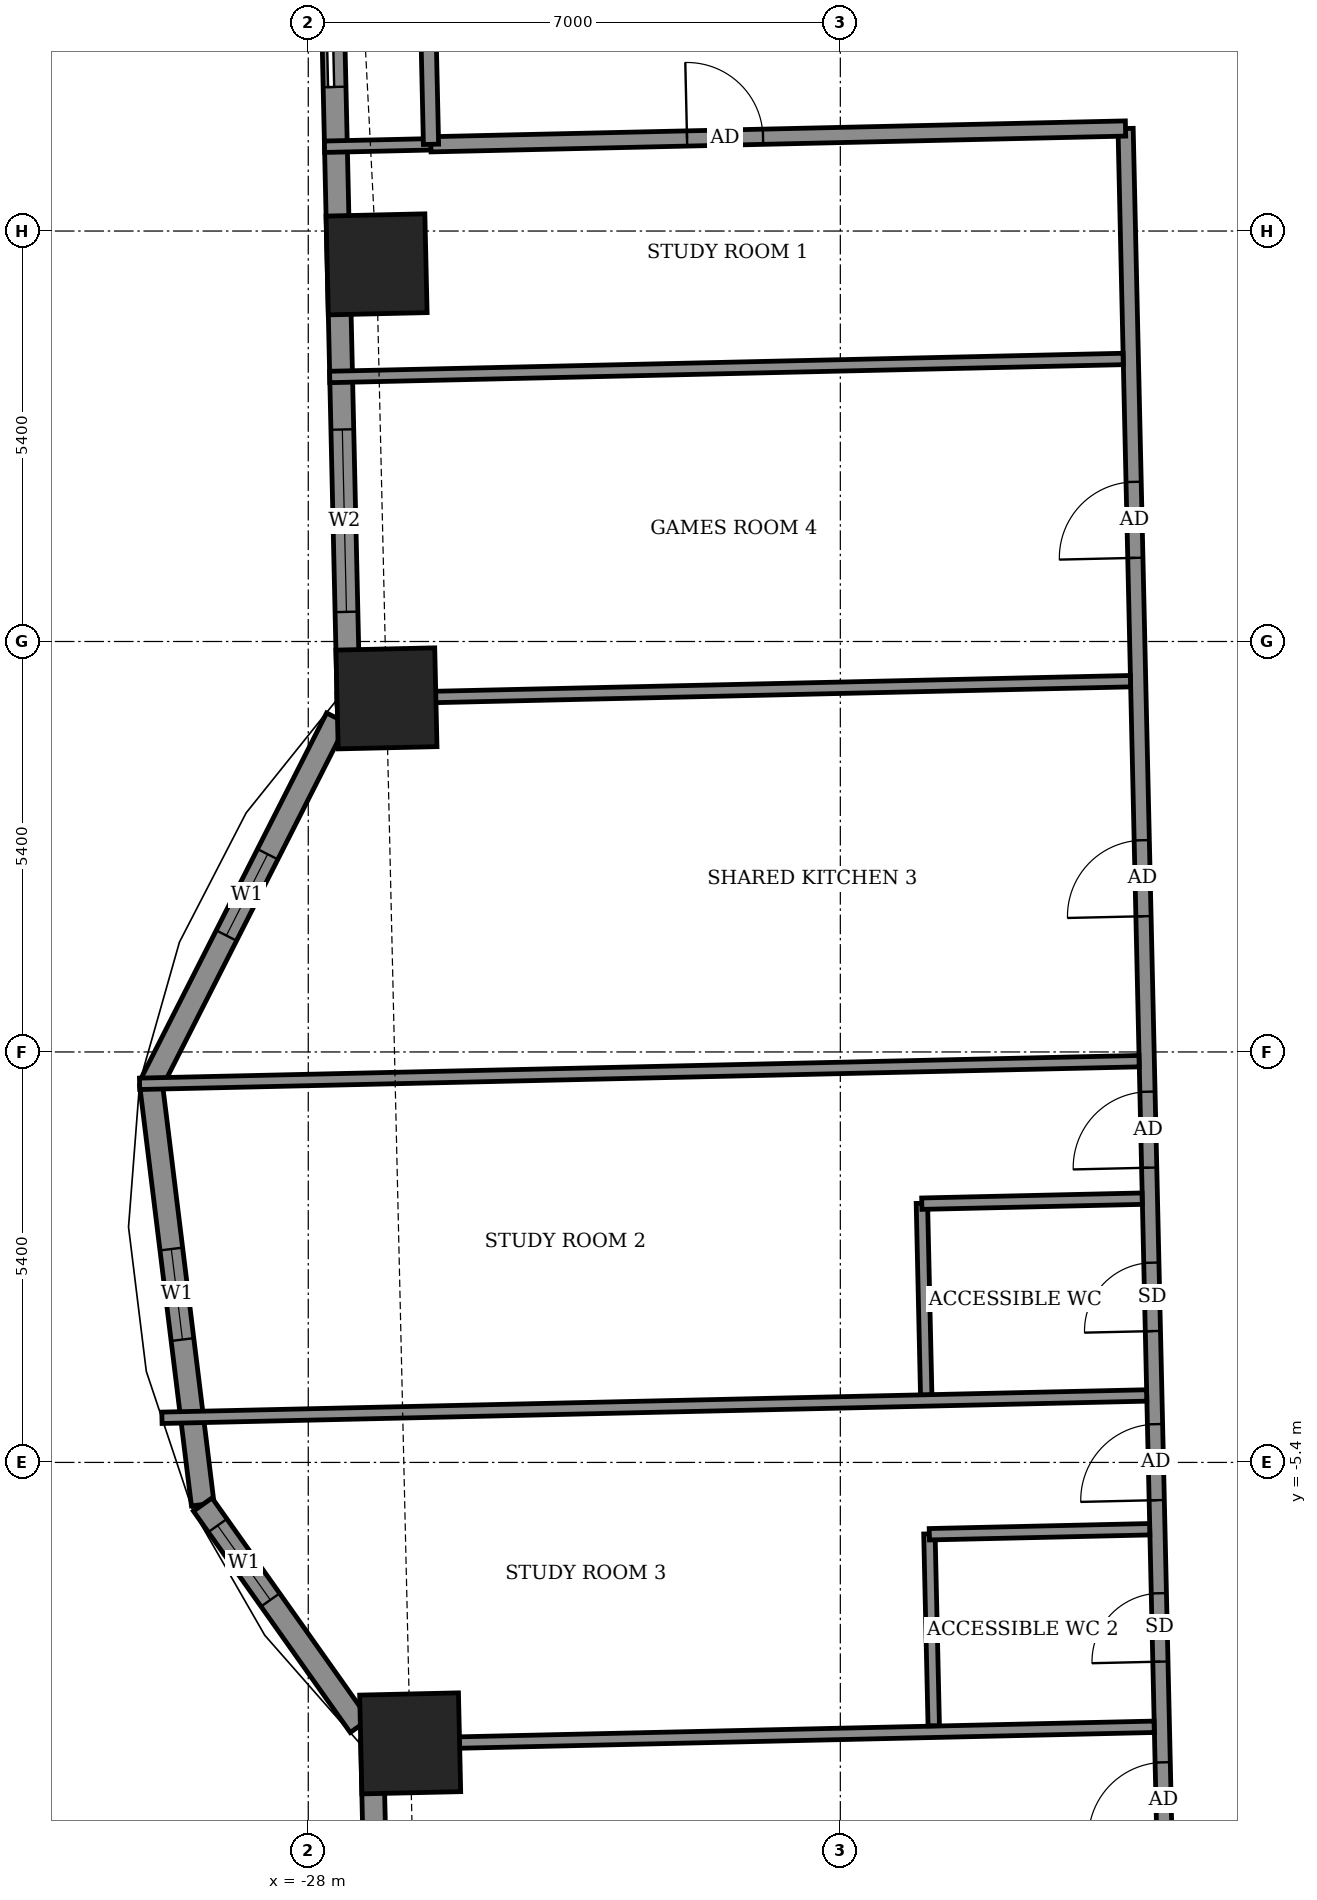
"""IFC4 building model, lengths in metres.
Left out: names, types, materials, properties, quantities, classifications, styles, units other than length and angle.
Written with IfcOpenShell. Run it as: python <this file> out.ifc"""

import sys

from ifc_helpers import new_model, si_unit, direction, frame, frame_2d, origin, origin_2d, place, context, subcontext, project, spatial, rectangle, extrude, element, fill, save


model = new_model("IFC4")
c1 = context("Model", 3, precision=1e-05, world=origin(), true_north=direction((0.0, 1.0)))
c2 = subcontext(c1, "Body", "Model", "MODEL_VIEW")
j1 = project(units=[si_unit("LENGTHUNIT", "METRE"), si_unit("PLANEANGLEUNIT", "RADIAN")], contexts=[c1])
p1 = place(None, origin())
s1 = spatial("IfcSite", under=j1, at=p1, CompositionType="ELEMENT")
p2 = place(p1, origin())
s2 = spatial("IfcBuilding", under=s1, at=p2, CompositionType="ELEMENT")
p3 = place(p2, frame((0.0, 0.0, 144.5)))
s3 = spatial("IfcBuildingStorey", under=s2, at=p3, CompositionType="ELEMENT", Elevation=144.5)
for number, where, z_axis, x_axis in (
    (1, (-26.659, -9.096, -0.55), (0.0, 0.0, 1.0), (0.023, -1.0, 0.0)),
    (2, (-27.101, 10.362, -0.55), (0.0, 0.0, 1.0), (0.023, -1.0, 0.0)),
    (3, (-26.971, 4.652, -0.55), (0.0, 0.0, 1.0), (0.023, -1.0, 0.0)),
):
    element("IfcColumn", number, at=place(p3, frame(where, z_axis=z_axis, x_axis=x_axis)), inside=s3, PredefinedType="COLUMN", context=c2, shape_type="SweptSolid", body=[
        extrude(rectangle(XDim=1.3, YDim=1.3, at=origin_2d()), origin(), (0.0, 0.0, 1.0), 3.6),
    ])
p4 = place(p3, frame((-27.727, 15.912, 0.0), z_axis=(0.0, 0.0, 1.0), x_axis=(0.022690078929, -0.999742547018, 0.0)))
e4 = element("IfcWall", 4, at=p4, inside=s3, PredefinedType="SOLIDWALL", context=c2, shape_type="SweptSolid", body=[
    extrude(rectangle(XDim=11.33, YDim=0.3, at=frame_2d((5.665, 0.0))), origin(), (0.0, 0.0, 1.0), 3.05),
])
p5 = place(p4, frame((1.717, 0.0, 0.0)))
e5 = element("IfcOpeningElement", 5, at=p5, cuts=e4, PredefinedType="OPENING", context=c2, shape_type="SweptSolid", body=[
    extrude(rectangle(XDim=1.5, YDim=2.4, at=frame_2d((0.75, 1.2))), frame((0.0, 0.16, 0.0), z_axis=(0.0, -1.0, 0.0), x_axis=(1.0, 0.0, 0.0)), (0.0, 0.0, 1.0), 0.32),
])
p6 = place(p4, frame((7.725, 0.0, 0.9)))
e6 = element("IfcOpeningElement", 6, at=p6, cuts=e4, PredefinedType="OPENING", context=c2, shape_type="SweptSolid", body=[
    extrude(rectangle(XDim=2.4, YDim=1.5, at=frame_2d((1.2, 0.75))), frame((0.0, 0.16, 0.0), z_axis=(0.0, -1.0, 0.0), x_axis=(1.0, 0.0, 0.0)), (0.0, 0.0, 1.0), 0.32),
])
p7 = place(p3, frame((-27.625, 4.392, 0.0), z_axis=(0.0, 0.0, 1.0), x_axis=(-0.45268572245, -0.891670138947, 0.0)))
e7 = element("IfcWall", 7, at=p7, inside=s3, PredefinedType="SOLIDWALL", context=c2, shape_type="SweptSolid", body=[
    extrude(rectangle(XDim=5.399, YDim=0.3, at=frame_2d((2.7, 0.0))), origin(), (0.0, 0.0, 1.0), 3.05),
])
p8 = place(p7, frame((2.008, 0.0, 0.9)))
e8 = element("IfcOpeningElement", 8, at=p8, cuts=e7, PredefinedType="OPENING", context=c2, shape_type="SweptSolid", body=[
    extrude(rectangle(XDim=1.2, YDim=1.5, at=frame_2d((0.6, 0.75))), frame((0.0, 0.16, 0.0), z_axis=(0.0, -1.0, 0.0), x_axis=(1.0, 0.0, 0.0)), (0.0, 0.0, 1.0), 0.32),
])
p9 = place(p3, frame((-30.069, -0.422, 0.0), z_axis=(0.0, 0.0, 1.0), x_axis=(0.122206978992, -0.992504636909, 0.0)))
e9 = element("IfcWall", 9, at=p9, inside=s3, PredefinedType="SOLIDWALL", context=c2, shape_type="SweptSolid", body=[
    extrude(rectangle(XDim=5.574, YDim=0.3, at=frame_2d((2.787, 0.0))), origin(), (0.0, 0.0, 1.0), 3.05),
])
p10 = place(p9, frame((2.187, 0.0, 0.9)))
e10 = element("IfcOpeningElement", 10, at=p10, cuts=e9, PredefinedType="OPENING", context=c2, shape_type="SweptSolid", body=[
    extrude(rectangle(XDim=1.2, YDim=1.5, at=frame_2d((0.6, 0.75))), frame((0.0, 0.16, 0.0), z_axis=(0.0, -1.0, 0.0), x_axis=(1.0, 0.0, 0.0)), (0.0, 0.0, 1.0), 0.32),
])
p11 = place(p3, frame((-29.388, -5.954, 0.0), z_axis=(0.0, 0.0, 1.0), x_axis=(0.578095163598, -0.815969351033, 0.0)))
e11 = element("IfcWall", 11, at=p11, inside=s3, PredefinedType="SOLIDWALL", context=c2, shape_type="SweptSolid", body=[
    extrude(rectangle(XDim=3.569, YDim=0.3, at=frame_2d((1.784, 0.0))), origin(), (0.0, 0.0, 1.0), 3.05),
])
p12 = place(p11, frame((0.338, 0.0, 0.9)))
e12 = element("IfcOpeningElement", 12, at=p12, cuts=e11, PredefinedType="OPENING", context=c2, shape_type="SweptSolid", body=[
    extrude(rectangle(XDim=1.2, YDim=1.5, at=frame_2d((0.6, 0.75))), frame((0.0, 0.16, 0.0), z_axis=(0.0, -1.0, 0.0), x_axis=(1.0, 0.0, 0.0)), (0.0, 0.0, 1.0), 0.32),
])
p13 = place(p3, frame((-27.161, -9.052, 0.0), z_axis=(0.0, 0.0, 1.0), x_axis=(0.022665616813, -0.999743101909, 0.0)))
e13 = element("IfcWall", 13, at=p13, inside=s3, PredefinedType="SOLIDWALL", context=c2, shape_type="SweptSolid", body=[
    extrude(rectangle(XDim=11.73, YDim=0.3, at=frame_2d((5.865, 0.0))), origin(), (0.0, 0.0, 1.0), 3.05),
])
p14 = place(p13, frame((1.679, 0.0, 0.0)))
e14 = element("IfcOpeningElement", 14, at=p14, cuts=e13, PredefinedType="OPENING", context=c2, shape_type="SweptSolid", body=[
    extrude(rectangle(XDim=1.5, YDim=2.4, at=frame_2d((0.75, 1.2))), frame((0.0, 0.16, 0.0), z_axis=(0.0, -1.0, 0.0), x_axis=(1.0, 0.0, 0.0)), (0.0, 0.0, 1.0), 0.32),
])
p15 = place(p13, frame((7.892, 0.0, 0.9)))
e15 = element("IfcOpeningElement", 15, at=p15, cuts=e13, PredefinedType="OPENING", context=c2, shape_type="SweptSolid", body=[
    extrude(rectangle(XDim=2.4, YDim=1.5, at=frame_2d((1.2, 0.75))), frame((0.0, 0.16, 0.0), z_axis=(0.0, -1.0, 0.0), x_axis=(1.0, 0.0, 0.0)), (0.0, 0.0, 1.0), 0.32),
])
p16 = place(p3, frame((-30.42, 12.7, 0.0), z_axis=(0.0, 0.0, 1.0), x_axis=(-0.02278694782, 0.999740343794, 0.0)))
e16 = element("IfcWall", 16, at=p16, inside=s3, PredefinedType="USERDEFINED", context=c2, shape_type="SweptSolid", body=[
    extrude(rectangle(XDim=3.3, YDim=0.55, at=frame_2d((1.65, 0.0))), origin(), (0.0, 0.0, 1.0), 0.8),
])
p17 = place(p3, frame((-16.603, -16.218, 0.0), z_axis=(0.0, 0.0, 1.0), x_axis=(-0.022698146637, 0.999742363881, 0.0)))
e17 = element("IfcWall", 17, at=p17, inside=s3, PredefinedType="PARTITIONING", context=c2, shape_type="SweptSolid", body=[
    extrude(rectangle(XDim=28.374, YDim=0.2, at=frame_2d((14.187, 0.0))), origin(), (0.0, 0.0, 1.0), 3.05),
])
p18 = place(p17, frame((22.724, 0.0, 0.0)))
e18 = element("IfcOpeningElement", 18, at=p18, cuts=e17, PredefinedType="OPENING", context=c2, shape_type="SweptSolid", body=[
    extrude(rectangle(XDim=1.0, YDim=2.1, at=frame_2d((0.5, 1.05))), frame((0.0, 0.11, 0.0), z_axis=(0.0, -1.0, 0.0), x_axis=(1.0, 0.0, 0.0)), (0.0, 0.0, 1.0), 0.22),
])
p19 = place(p17, frame((18.008, 0.0, 0.0)))
e19 = element("IfcOpeningElement", 19, at=p19, cuts=e17, PredefinedType="OPENING", context=c2, shape_type="SweptSolid", body=[
    extrude(rectangle(XDim=1.0, YDim=2.1, at=frame_2d((0.5, 1.05))), frame((0.0, 0.11, 0.0), z_axis=(0.0, -1.0, 0.0), x_axis=(1.0, 0.0, 0.0)), (0.0, 0.0, 1.0), 0.22),
])
p20 = place(p17, frame((14.699, 0.0, 0.0)))
e20 = element("IfcOpeningElement", 20, at=p20, cuts=e17, PredefinedType="OPENING", context=c2, shape_type="SweptSolid", body=[
    extrude(rectangle(XDim=1.0, YDim=2.1, at=frame_2d((0.5, 1.05))), frame((0.0, 0.11, 0.0), z_axis=(0.0, -1.0, 0.0), x_axis=(1.0, 0.0, 0.0)), (0.0, 0.0, 1.0), 0.22),
])
p21 = place(p17, frame((12.549, 0.0, 0.0)))
e21 = element("IfcOpeningElement", 21, at=p21, cuts=e17, PredefinedType="OPENING", context=c2, shape_type="SweptSolid", body=[
    extrude(rectangle(XDim=0.9, YDim=2.1, at=frame_2d((0.45, 1.05))), frame((0.0, 0.11, 0.0), z_axis=(0.0, -1.0, 0.0), x_axis=(1.0, 0.0, 0.0)), (0.0, 0.0, 1.0), 0.22),
])
p22 = place(p17, frame((10.324, 0.0, 0.0)))
e22 = element("IfcOpeningElement", 22, at=p22, cuts=e17, PredefinedType="OPENING", context=c2, shape_type="SweptSolid", body=[
    extrude(rectangle(XDim=1.0, YDim=2.1, at=frame_2d((0.5, 1.05))), frame((0.0, 0.11, 0.0), z_axis=(0.0, -1.0, 0.0), x_axis=(1.0, 0.0, 0.0)), (0.0, 0.0, 1.0), 0.22),
])
p23 = place(p17, frame((8.199, 0.0, 0.0)))
e23 = element("IfcOpeningElement", 23, at=p23, cuts=e17, PredefinedType="OPENING", context=c2, shape_type="SweptSolid", body=[
    extrude(rectangle(XDim=0.9, YDim=2.1, at=frame_2d((0.45, 1.05))), frame((0.0, 0.11, 0.0), z_axis=(0.0, -1.0, 0.0), x_axis=(1.0, 0.0, 0.0)), (0.0, 0.0, 1.0), 0.22),
])
p24 = place(p17, frame((5.874, 0.0, 0.0)))
e24 = element("IfcOpeningElement", 24, at=p24, cuts=e17, PredefinedType="OPENING", context=c2, shape_type="SweptSolid", body=[
    extrude(rectangle(XDim=1.0, YDim=2.1, at=frame_2d((0.5, 1.05))), frame((0.0, 0.11, 0.0), z_axis=(0.0, -1.0, 0.0), x_axis=(1.0, 0.0, 0.0)), (0.0, 0.0, 1.0), 0.22),
])
p25 = place(p17, frame((3.75, 0.0, 0.0)))
e25 = element("IfcOpeningElement", 25, at=p25, cuts=e17, PredefinedType="OPENING", context=c2, shape_type="SweptSolid", body=[
    extrude(rectangle(XDim=0.9, YDim=2.1, at=frame_2d((0.45, 1.05))), frame((0.0, 0.11, 0.0), z_axis=(0.0, -1.0, 0.0), x_axis=(1.0, 0.0, 0.0)), (0.0, 0.0, 1.0), 0.22),
])
p26 = place(p3, frame((-27.01, -9.108, 0.0), z_axis=(0.0, 0.0, 1.0), x_axis=(0.999742841246, 0.022677111331, 0.0)))
e26 = element("IfcWall", 26, at=p26, inside=s3, PredefinedType="PARTITIONING", context=c2, shape_type="SweptSolid", body=[
    extrude(rectangle(XDim=10.142, YDim=0.15, at=frame_2d((5.071, 0.0))), origin(), (0.0, 0.0, 1.0), 3.05),
])
p27 = place(p3, frame((-19.771, -8.864, 0.0), z_axis=(0.0, 0.0, 1.0), x_axis=(-0.022532486354, 0.9997461113, 0.0)))
e27 = element("IfcWall", 27, at=p27, inside=s3, PredefinedType="PARTITIONING", context=c2, shape_type="SweptSolid", body=[
    extrude(rectangle(XDim=2.525, YDim=0.15, at=frame_2d((1.262, 0.0))), origin(), (0.0, 0.0, 1.0), 3.05),
])
p28 = place(p3, frame((-19.829, -6.345, 0.0), z_axis=(0.0, 0.0, 1.0), x_axis=(0.999741618182, 0.022730967319, 0.0)))
e28 = element("IfcWall", 28, at=p28, inside=s3, PredefinedType="PARTITIONING", context=c2, shape_type="SweptSolid", body=[
    extrude(rectangle(XDim=2.9, YDim=0.15, at=frame_2d((1.45, 0.0))), origin(), (0.0, 0.0, 1.0), 3.05),
])
p29 = place(p3, frame((-19.87, -4.515, 0.0), z_axis=(0.0, 0.0, 1.0), x_axis=(-0.022532486354, 0.9997461113, 0.0)))
e29 = element("IfcWall", 29, at=p29, inside=s3, PredefinedType="PARTITIONING", context=c2, shape_type="SweptSolid", body=[
    extrude(rectangle(XDim=2.525, YDim=0.15, at=frame_2d((1.262, 0.0))), origin(), (0.0, 0.0, 1.0), 3.05),
])
p30 = place(p3, frame((-29.925, -4.813, 0.0), z_axis=(0.0, 0.0, 1.0), x_axis=(0.999742690772, 0.022683744152, 0.0)))
e30 = element("IfcWall", 30, at=p30, inside=s3, PredefinedType="PARTITIONING", context=c2, shape_type="SweptSolid", body=[
    extrude(rectangle(XDim=12.958, YDim=0.15, at=frame_2d((6.479, 0.0))), origin(), (0.0, 0.0, 1.0), 2.05),
])
p31 = place(p3, frame((-19.928, -1.996, 0.0), z_axis=(0.0, 0.0, 1.0), x_axis=(0.999739657619, 0.022817032779, 0.0)))
e31 = element("IfcWall", 31, at=p31, inside=s3, PredefinedType="PARTITIONING", context=c2, shape_type="SweptSolid", body=[
    extrude(rectangle(XDim=2.9, YDim=0.15, at=frame_2d((1.45, 0.0))), origin(), (0.0, 0.0, 1.0), 3.05),
])
p32 = place(p3, frame((-30.219, -0.419, 0.0), z_axis=(0.0, 0.0, 1.0), x_axis=(0.99974353853, 0.022646349976, 0.0)))
e32 = element("IfcWall", 32, at=p32, inside=s3, PredefinedType="PARTITIONING", context=c2, shape_type="SweptSolid", body=[
    extrude(rectangle(XDim=13.152, YDim=0.15, at=frame_2d((6.576, 0.0))), origin(), (0.0, 0.0, 1.0), 2.05),
])
p33 = place(p3, frame((-27.621, 4.641, 0.0), z_axis=(0.0, 0.0, 1.0), x_axis=(0.999742728106, 0.022682098664, 0.0)))
e33 = element("IfcWall", 33, at=p33, inside=s3, PredefinedType="PARTITIONING", context=c2, shape_type="SweptSolid", body=[
    extrude(rectangle(XDim=10.441, YDim=0.15, at=frame_2d((5.22, 0.0))), origin(), (0.0, 0.0, 1.0), 3.05),
])
p34 = place(p3, frame((-27.718, 8.88, 0.0), z_axis=(0.0, 0.0, 1.0), x_axis=(0.999742245794, 0.022703347225, 0.0)))
e34 = element("IfcWall", 34, at=p34, inside=s3, PredefinedType="PARTITIONING", context=c2, shape_type="SweptSolid", body=[
    extrude(rectangle(XDim=10.442, YDim=0.15, at=frame_2d((5.221, 0.0))), origin(), (0.0, 0.0, 1.0), 2.55),
])
p35 = place(p3, frame((-27.786, 11.909, 0.0), z_axis=(0.0, 0.0, 1.0), x_axis=(0.999740216184, 0.022792545827, 0.0)))
e35 = element("IfcWall", 35, at=p35, inside=s3, PredefinedType="PARTITIONING", context=c2, shape_type="SweptSolid", body=[
    extrude(rectangle(XDim=1.403, YDim=0.15, at=frame_2d((0.702, 0.0))), origin(), (0.0, 0.0, 1.0), 2.55),
])
p36 = place(p3, frame((-26.387, 11.941, 0.0), z_axis=(0.0, 0.0, 1.0), x_axis=(0.999741076645, 0.022754772455, 0.0)))
e36 = element("IfcWall", 36, at=p36, inside=s3, PredefinedType="PARTITIONING", context=c2, shape_type="SweptSolid", body=[
    extrude(rectangle(XDim=9.141, YDim=0.2, at=frame_2d((4.571, 0.0))), origin(), (0.0, 0.0, 1.0), 3.05),
])
p37 = place(p36, frame((3.371, 0.0, 0.0)))
e37 = element("IfcOpeningElement", 37, at=p37, cuts=e36, PredefinedType="OPENING", context=c2, shape_type="SweptSolid", body=[
    extrude(rectangle(XDim=1.0, YDim=2.1, at=frame_2d((0.5, 1.05))), frame((0.0, 0.11, 0.0), z_axis=(0.0, -1.0, 0.0), x_axis=(1.0, 0.0, 0.0)), (0.0, 0.0, 1.0), 0.22),
])
p38 = place(p3, frame((-26.385, 11.941, 0.0), z_axis=(0.0, 0.0, 1.0), x_axis=(-0.022617910375, 0.999744182344, 0.0)))
e38 = element("IfcWall", 38, at=p38, inside=s3, PredefinedType="PARTITIONING", context=c2, shape_type="SweptSolid", body=[
    extrude(rectangle(XDim=1.5, YDim=0.2, at=frame_2d((0.75, 0.0))), origin(), (0.0, 0.0, 1.0), 3.05),
])
p39 = place(p5, origin())
e39 = element("IfcDoor", 39, at=p39, inside=s3, OperationType="SLIDING_TO_LEFT", PredefinedType="DOOR", context=c2, shape_type="SweptSolid", body=[
    extrude(rectangle(XDim=1.5, YDim=2.4, at=frame_2d((0.75, 1.2))), frame((0.0, 0.025, 0.0), z_axis=(0.0, -1.0, 0.0), x_axis=(1.0, 0.0, 0.0)), (0.0, 0.0, 1.0), 0.05),
])
fill(e5, e39)
p40 = place(p6, origin())
e40 = element("IfcWindow", 40, at=p40, inside=s3, PartitioningType="DOUBLE_PANEL_VERTICAL", PredefinedType="WINDOW", context=c2, shape_type="SweptSolid", body=[
    extrude(rectangle(XDim=2.4, YDim=1.5, at=frame_2d((1.2, 0.75))), frame((0.0, 0.03, 0.0), z_axis=(0.0, -1.0, 0.0), x_axis=(1.0, 0.0, 0.0)), (0.0, 0.0, 1.0), 0.06),
])
fill(e6, e40)
p41 = place(p8, origin())
e41 = element("IfcWindow", 41, at=p41, inside=s3, PartitioningType="SINGLE_PANEL", PredefinedType="WINDOW", context=c2, shape_type="SweptSolid", body=[
    extrude(rectangle(XDim=1.2, YDim=1.5, at=frame_2d((0.6, 0.75))), frame((0.0, 0.03, 0.0), z_axis=(0.0, -1.0, 0.0), x_axis=(1.0, 0.0, 0.0)), (0.0, 0.0, 1.0), 0.06),
])
fill(e8, e41)
p42 = place(p10, origin())
e42 = element("IfcWindow", 42, at=p42, inside=s3, PartitioningType="SINGLE_PANEL", PredefinedType="WINDOW", context=c2, shape_type="SweptSolid", body=[
    extrude(rectangle(XDim=1.2, YDim=1.5, at=frame_2d((0.6, 0.75))), frame((0.0, 0.03, 0.0), z_axis=(0.0, -1.0, 0.0), x_axis=(1.0, 0.0, 0.0)), (0.0, 0.0, 1.0), 0.06),
])
fill(e10, e42)
p43 = place(p12, origin())
e43 = element("IfcWindow", 43, at=p43, inside=s3, PartitioningType="SINGLE_PANEL", PredefinedType="WINDOW", context=c2, shape_type="SweptSolid", body=[
    extrude(rectangle(XDim=1.2, YDim=1.5, at=frame_2d((0.6, 0.75))), frame((0.0, 0.03, 0.0), z_axis=(0.0, -1.0, 0.0), x_axis=(1.0, 0.0, 0.0)), (0.0, 0.0, 1.0), 0.06),
])
fill(e12, e43)
p44 = place(p37, origin())
e44 = element("IfcDoor", 44, at=p44, inside=s3, OperationType="SINGLE_SWING_RIGHT", PredefinedType="DOOR", context=c2, shape_type="SweptSolid", body=[
    extrude(rectangle(XDim=1.0, YDim=2.1, at=frame_2d((0.5, 1.05))), frame((0.0, 0.025, 0.0), z_axis=(0.0, -1.0, 0.0), x_axis=(1.0, 0.0, 0.0)), (0.0, 0.0, 1.0), 0.05),
])
fill(e37, e44)
p45 = place(p18, origin())
e45 = element("IfcDoor", 45, at=p45, inside=s3, OperationType="SINGLE_SWING_LEFT", PredefinedType="DOOR", context=c2, shape_type="SweptSolid", body=[
    extrude(rectangle(XDim=1.0, YDim=2.1, at=frame_2d((0.5, 1.05))), frame((0.0, 0.025, 0.0), z_axis=(0.0, -1.0, 0.0), x_axis=(1.0, 0.0, 0.0)), (0.0, 0.0, 1.0), 0.05),
])
fill(e18, e45)
p46 = place(p19, origin())
e46 = element("IfcDoor", 46, at=p46, inside=s3, OperationType="SINGLE_SWING_RIGHT", PredefinedType="DOOR", context=c2, shape_type="SweptSolid", body=[
    extrude(rectangle(XDim=1.0, YDim=2.1, at=frame_2d((0.5, 1.05))), frame((0.0, 0.025, 0.0), z_axis=(0.0, -1.0, 0.0), x_axis=(1.0, 0.0, 0.0)), (0.0, 0.0, 1.0), 0.05),
])
fill(e19, e46)
p47 = place(p20, origin())
e47 = element("IfcDoor", 47, at=p47, inside=s3, OperationType="SINGLE_SWING_LEFT", PredefinedType="DOOR", context=c2, shape_type="SweptSolid", body=[
    extrude(rectangle(XDim=1.0, YDim=2.1, at=frame_2d((0.5, 1.05))), frame((0.0, 0.025, 0.0), z_axis=(0.0, -1.0, 0.0), x_axis=(1.0, 0.0, 0.0)), (0.0, 0.0, 1.0), 0.05),
])
fill(e20, e47)
p48 = place(p21, origin())
e48 = element("IfcDoor", 48, at=p48, inside=s3, OperationType="SINGLE_SWING_LEFT", PredefinedType="DOOR", context=c2, shape_type="SweptSolid", body=[
    extrude(rectangle(XDim=0.9, YDim=2.1, at=frame_2d((0.45, 1.05))), frame((0.0, 0.025, 0.0), z_axis=(0.0, -1.0, 0.0), x_axis=(1.0, 0.0, 0.0)), (0.0, 0.0, 1.0), 0.05),
])
fill(e21, e48)
p49 = place(p22, origin())
e49 = element("IfcDoor", 49, at=p49, inside=s3, OperationType="SINGLE_SWING_RIGHT", PredefinedType="DOOR", context=c2, shape_type="SweptSolid", body=[
    extrude(rectangle(XDim=1.0, YDim=2.1, at=frame_2d((0.5, 1.05))), frame((0.0, 0.025, 0.0), z_axis=(0.0, -1.0, 0.0), x_axis=(1.0, 0.0, 0.0)), (0.0, 0.0, 1.0), 0.05),
])
fill(e22, e49)
p50 = place(p23, origin())
e50 = element("IfcDoor", 50, at=p50, inside=s3, OperationType="SINGLE_SWING_RIGHT", PredefinedType="DOOR", context=c2, shape_type="SweptSolid", body=[
    extrude(rectangle(XDim=0.9, YDim=2.1, at=frame_2d((0.45, 1.05))), frame((0.0, 0.025, 0.0), z_axis=(0.0, -1.0, 0.0), x_axis=(1.0, 0.0, 0.0)), (0.0, 0.0, 1.0), 0.05),
])
fill(e23, e50)
p51 = place(p24, origin())
e51 = element("IfcDoor", 51, at=p51, inside=s3, OperationType="SINGLE_SWING_LEFT", PredefinedType="DOOR", context=c2, shape_type="SweptSolid", body=[
    extrude(rectangle(XDim=1.0, YDim=2.1, at=frame_2d((0.5, 1.05))), frame((0.0, 0.025, 0.0), z_axis=(0.0, -1.0, 0.0), x_axis=(1.0, 0.0, 0.0)), (0.0, 0.0, 1.0), 0.05),
])
fill(e24, e51)
save(model, sys.argv[1])
